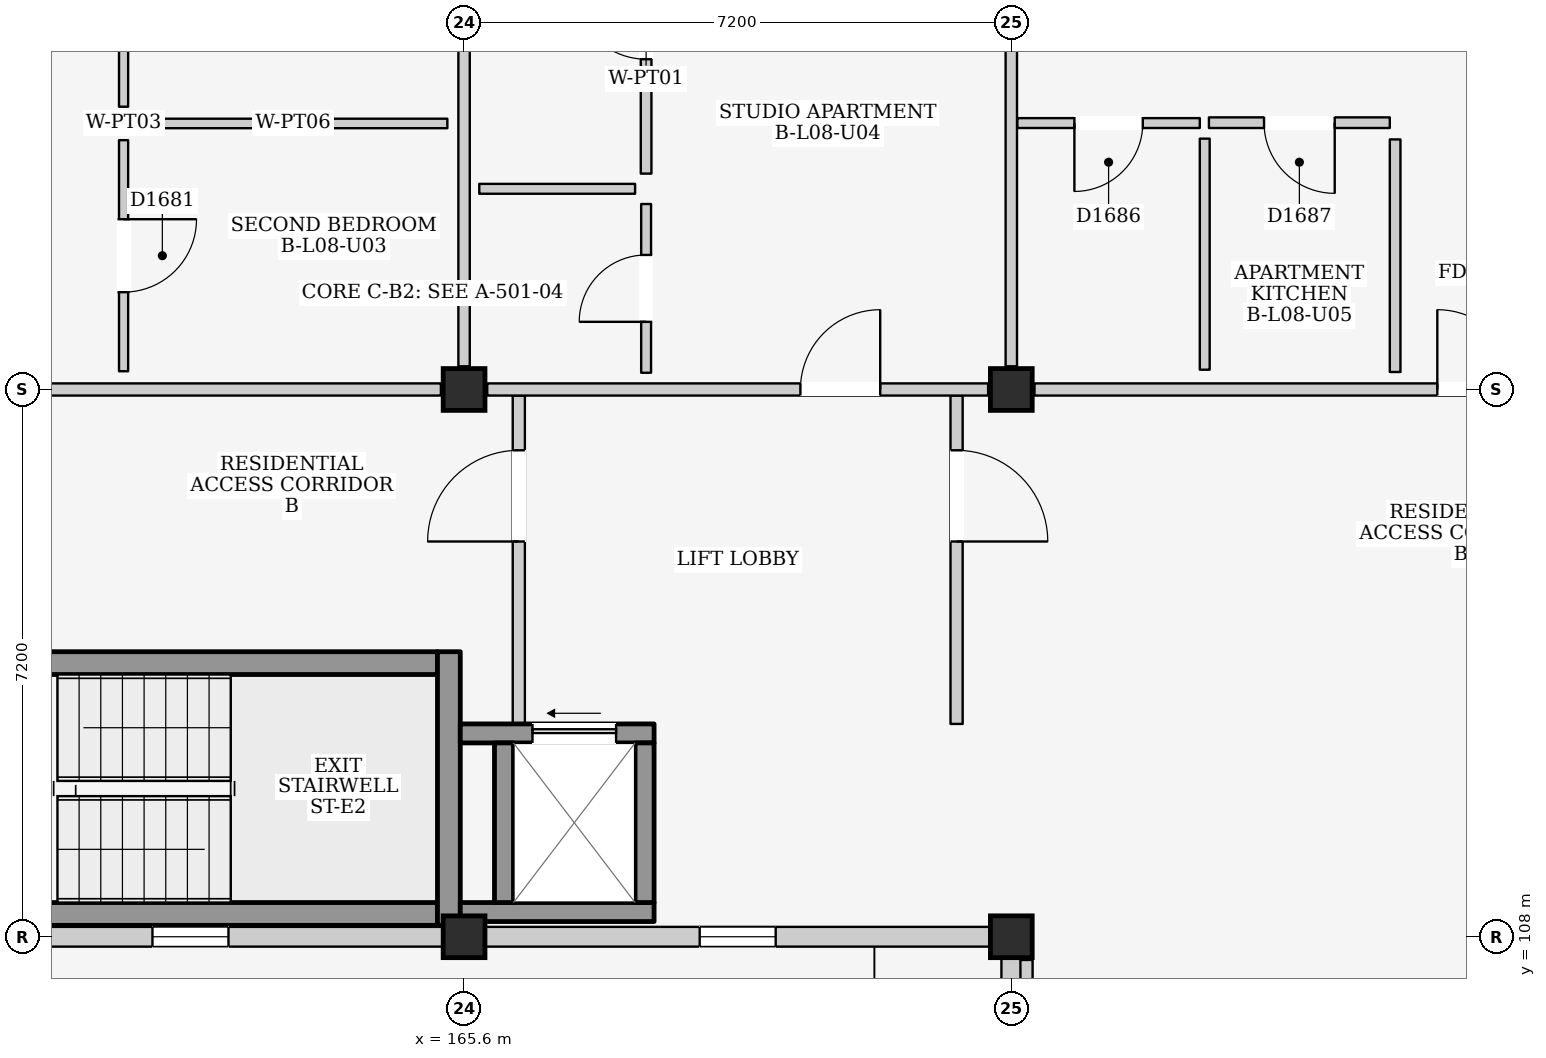
"""IFC4 building model, lengths in metres.
Left out: names, types, materials, properties, quantities, classifications, styles, units other than length and angle.
Written with IfcOpenShell. Run it as: python <this file> out.ifc"""

import sys

from ifc_helpers import new_model, si_unit, direction, frame, frame_2d, origin, origin_2d, place, context, subcontext, project, spatial, rectangle, extrude, element, fill, save


model = new_model("IFC4")
c1 = context("Model", 3, precision=1e-05, world=origin(), true_north=direction((0.0, 1.0)))
c2 = subcontext(c1, "Body", "Model", "MODEL_VIEW")
j1 = project(units=[si_unit("LENGTHUNIT", "METRE"), si_unit("PLANEANGLEUNIT", "RADIAN")], contexts=[c1])
p1 = place(None, origin())
s1 = spatial("IfcSite", under=j1, at=p1, CompositionType="ELEMENT")
p2 = place(p1, origin())
s2 = spatial("IfcBuilding", under=s1, at=p2, CompositionType="ELEMENT")
p3 = place(p2, frame((0.0, 0.0, 28.3)))
s3 = spatial("IfcBuildingStorey", under=s2, at=p3, CompositionType="ELEMENT", Elevation=28.3)
for number, where, z_axis, x_axis in (
    (1, (165.6, 108.0, 0.0), (0.0, 0.0, 1.0), (1.0, 0.0, 0.0)),
    (2, (165.6, 115.2, 0.0), (0.0, 0.0, 1.0), (1.0, 0.0, 0.0)),
    (3, (172.8, 108.0, 0.0), (0.0, 0.0, 1.0), (1.0, 0.0, 0.0)),
    (4, (172.8, 115.2, 0.0), (0.0, 0.0, 1.0), (1.0, 0.0, 0.0)),
):
    element("IfcColumn", number, at=place(p3, frame(where, z_axis=z_axis, x_axis=x_axis)), inside=s3, PredefinedType="COLUMN", context=c2, shape_type="SweptSolid", body=[
        extrude(rectangle(XDim=0.55, YDim=0.55, at=origin_2d()), origin(), (0.0, 0.0, 1.0), 3.2),
    ])
p4 = place(p3, frame((158.675, 108.0, 0.0), z_axis=(0.0, 0.0, 1.0), x_axis=(1.0, 0.0, 0.0)))
e5 = element("IfcWall", 5, at=p4, inside=s3, PredefinedType="ELEMENTEDWALL", context=c2, shape_type="SweptSolid", body=[
    extrude(rectangle(XDim=6.65, YDim=0.26, at=frame_2d((3.325, 0.0))), origin(), (0.0, 0.0, 1.0), 2.335),
])
p5 = place(p4, frame((2.825, 0.0, 1.2)))
e6 = element("IfcOpeningElement", 6, at=p5, cuts=e5, PredefinedType="OPENING", context=c2, shape_type="SweptSolid", body=[
    extrude(rectangle(XDim=1.0, YDim=0.9, at=frame_2d((0.5, 0.45))), frame((0.0, 0.145, 0.0), z_axis=(0.0, -1.0, 0.0), x_axis=(1.0, 0.0, 0.0)), (0.0, 0.0, 1.0), 0.29),
])
p6 = place(p3, frame((165.875, 108.0, 0.0), z_axis=(0.0, 0.0, 1.0), x_axis=(1.0, 0.0, 0.0)))
e7 = element("IfcWall", 7, at=p6, inside=s3, PredefinedType="ELEMENTEDWALL", context=c2, shape_type="SweptSolid", body=[
    extrude(rectangle(XDim=6.65, YDim=0.26, at=frame_2d((3.325, 0.0))), origin(), (0.0, 0.0, 1.0), 2.335),
])
p7 = place(p6, frame((2.825, 0.0, 1.2)))
e8 = element("IfcOpeningElement", 8, at=p7, cuts=e7, PredefinedType="OPENING", context=c2, shape_type="SweptSolid", body=[
    extrude(rectangle(XDim=1.0, YDim=0.9, at=frame_2d((0.5, 0.45))), frame((0.0, 0.145, 0.0), z_axis=(0.0, -1.0, 0.0), x_axis=(1.0, 0.0, 0.0)), (0.0, 0.0, 1.0), 0.29),
])
p8 = place(p3, frame((172.8, 101.075, 0.0), z_axis=(0.0, 0.0, 1.0), x_axis=(0.0, 1.0, 0.0)))
e9 = element("IfcWall", 9, at=p8, inside=s3, PredefinedType="ELEMENTEDWALL", context=c2, shape_type="SweptSolid", body=[
    extrude(rectangle(XDim=6.65, YDim=0.26, at=frame_2d((3.325, 0.0))), origin(), (0.0, 0.0, 1.0), 2.435),
])
p9 = place(p8, frame((2.5, 0.0, 0.0)))
e10 = element("IfcOpeningElement", 10, at=p9, cuts=e9, PredefinedType="OPENING", context=c2, shape_type="SweptSolid", body=[
    extrude(rectangle(XDim=1.4, YDim=2.1, at=frame_2d((0.7, 1.05))), frame((0.0, 0.145, 0.0), z_axis=(0.0, -1.0, 0.0), x_axis=(1.0, 0.0, 0.0)), (0.0, 0.0, 1.0), 0.29),
])
p10 = place(p3, frame((158.75, 108.3, 0.0), z_axis=(0.0, 0.0, 1.0), x_axis=(1.0, 0.0, 0.0)))
e11 = element("IfcWall", 11, at=p10, inside=s3, PredefinedType="SHEAR", context=c2, shape_type="SweptSolid", body=[
    extrude(rectangle(XDim=6.5, YDim=0.3, at=frame_2d((3.25, 0.0))), origin(), (0.0, 0.0, 1.0), 2.95),
])
p11 = place(p3, frame((158.75, 111.6, 0.0), z_axis=(0.0, 0.0, 1.0), x_axis=(1.0, 0.0, 0.0)))
e12 = element("IfcWall", 12, at=p11, inside=s3, PredefinedType="SHEAR", context=c2, shape_type="SweptSolid", body=[
    extrude(rectangle(XDim=6.5, YDim=0.3, at=frame_2d((3.25, 0.0))), origin(), (0.0, 0.0, 1.0), 2.95),
])
p12 = place(p11, frame((0.18, 0.0, 0.0)))
e13 = element("IfcOpeningElement", 13, at=p12, cuts=e12, PredefinedType="OPENING", context=c2, shape_type="SweptSolid", body=[
    extrude(rectangle(XDim=1.15, YDim=2.2, at=frame_2d((0.575, 1.1))), frame((0.0, 0.165, 0.0), z_axis=(0.0, -1.0, 0.0), x_axis=(1.0, 0.0, 0.0)), (0.0, 0.0, 1.0), 0.33),
])
p13 = place(p3, frame((165.4, 108.15, 0.0), z_axis=(0.0, 0.0, 1.0), x_axis=(0.0, 1.0, 0.0)))
e14 = element("IfcWall", 14, at=p13, inside=s3, PredefinedType="SHEAR", context=c2, shape_type="SweptSolid", body=[
    extrude(rectangle(XDim=3.6, YDim=0.3, at=frame_2d((1.8, 0.0))), origin(), (0.0, 0.0, 1.0), 2.95),
])
p14 = place(p3, frame((166.32, 110.8, 0.0), z_axis=(0.0, 0.0, 1.0), x_axis=(0.0, 1.0, 0.0)))
e15 = element("IfcWall", 15, at=p14, inside=s3, PredefinedType="PARTITIONING", context=c2, shape_type="SweptSolid", body=[
    extrude(rectangle(XDim=4.32, YDim=0.16, at=frame_2d((2.16, 0.0))), origin(), (0.0, 0.0, 1.0), 2.95),
])
p15 = place(p14, frame((2.4, 0.0, 0.0)))
e16 = element("IfcOpeningElement", 16, at=p15, cuts=e15, PredefinedType="OPENING", context=c2, shape_type="SweptSolid", body=[
    extrude(rectangle(XDim=1.2, YDim=2.2, at=frame_2d((0.6, 1.1))), frame((0.0, 0.095, 0.0), z_axis=(0.0, -1.0, 0.0), x_axis=(1.0, 0.0, 0.0)), (0.0, 0.0, 1.0), 0.19),
])
p16 = place(p3, frame((172.08, 110.8, 0.0), z_axis=(0.0, 0.0, 1.0), x_axis=(0.0, 1.0, 0.0)))
e17 = element("IfcWall", 17, at=p16, inside=s3, PredefinedType="PARTITIONING", context=c2, shape_type="SweptSolid", body=[
    extrude(rectangle(XDim=4.32, YDim=0.16, at=frame_2d((2.16, 0.0))), origin(), (0.0, 0.0, 1.0), 2.95),
])
p17 = place(p16, frame((2.4, 0.0, 0.0)))
e18 = element("IfcOpeningElement", 18, at=p17, cuts=e17, PredefinedType="OPENING", context=c2, shape_type="SweptSolid", body=[
    extrude(rectangle(XDim=1.2, YDim=2.2, at=frame_2d((0.6, 1.1))), frame((0.0, 0.095, 0.0), z_axis=(0.0, -1.0, 0.0), x_axis=(1.0, 0.0, 0.0)), (0.0, 0.0, 1.0), 0.19),
])
p18 = place(p3, frame((165.55, 108.325, 0.0), z_axis=(0.0, 0.0, 1.0), x_axis=(1.0, 0.0, 0.0)))
e19 = element("IfcWall", 19, at=p18, inside=s3, PredefinedType="SHEAR", context=c2, shape_type="SweptSolid", body=[
    extrude(rectangle(XDim=2.55, YDim=0.25, at=frame_2d((1.275, 0.0))), origin(), (0.0, 0.0, 1.0), 2.95),
])
p19 = place(p3, frame((165.55, 110.675, 0.0), z_axis=(0.0, 0.0, 1.0), x_axis=(1.0, 0.0, 0.0)))
e20 = element("IfcWall", 20, at=p19, inside=s3, PredefinedType="SHEAR", context=c2, shape_type="SweptSolid", body=[
    extrude(rectangle(XDim=2.55, YDim=0.25, at=frame_2d((1.275, 0.0))), origin(), (0.0, 0.0, 1.0), 2.95),
])
p20 = place(p19, frame((0.95, 0.0, 0.0)))
e21 = element("IfcOpeningElement", 21, at=p20, cuts=e20, PredefinedType="OPENING", context=c2, shape_type="SweptSolid", body=[
    extrude(rectangle(XDim=1.1, YDim=2.15, at=frame_2d((0.55, 1.075))), frame((0.0, 0.14, 0.0), z_axis=(0.0, -1.0, 0.0), x_axis=(1.0, 0.0, 0.0)), (0.0, 0.0, 1.0), 0.28),
])
for number, where, z_axis, x_axis in (
    (22, (166.125, 108.45, 0.0), (0.0, 0.0, 1.0), (0.0, 1.0, 0.0)),
    (23, (167.975, 108.45, 0.0), (0.0, 0.0, 1.0), (0.0, 1.0, 0.0)),
):
    element("IfcWall", number, at=place(p3, frame(where, z_axis=z_axis, x_axis=x_axis)), inside=s3, PredefinedType="SHEAR", context=c2, shape_type="SweptSolid", body=[
        extrude(rectangle(XDim=2.1, YDim=0.25, at=frame_2d((1.05, 0.0))), origin(), (0.0, 0.0, 1.0), 2.95),
    ])
p21 = place(p3, frame((158.705, 115.2, 0.0), z_axis=(0.0, 0.0, 1.0), x_axis=(1.0, 0.0, 0.0)))
e24 = element("IfcWall", 24, at=p21, inside=s3, PredefinedType="PARTITIONING", context=c2, shape_type="SweptSolid", body=[
    extrude(rectangle(XDim=6.59, YDim=0.16, at=frame_2d((3.295, 0.0))), origin(), (0.0, 0.0, 1.0), 2.335),
])
p22 = place(p3, frame((165.6, 115.505, 0.0), z_axis=(0.0, 0.0, 1.0), x_axis=(0.0, 1.0, 0.0)))
e25 = element("IfcWall", 25, at=p22, inside=s3, PredefinedType="PARTITIONING", context=c2, shape_type="SweptSolid", body=[
    extrude(rectangle(XDim=6.59, YDim=0.15, at=frame_2d((3.295, 0.0))), origin(), (0.0, 0.0, 1.0), 2.435),
])
p23 = place(p3, frame((161.12, 118.92, 0.0), z_axis=(0.0, 0.0, 1.0), x_axis=(0.0, 1.0, 0.0)))
e26 = element("IfcWall", 26, at=p23, inside=s3, PredefinedType="PARTITIONING", context=c2, shape_type="SweptSolid", body=[
    extrude(rectangle(XDim=3.04, YDim=0.12, at=frame_2d((1.52, 0.0))), origin(), (0.0, 0.0, 1.0), 2.95),
])
p24 = place(p23, frame((1.045, 0.0, 0.0)))
e27 = element("IfcOpeningElement", 27, at=p24, cuts=e26, PredefinedType="OPENING", context=c2, shape_type="SweptSolid", body=[
    extrude(rectangle(XDim=0.95, YDim=2.15, at=frame_2d((0.475, 1.075))), frame((0.0, 0.075, 0.0), z_axis=(0.0, -1.0, 0.0), x_axis=(1.0, 0.0, 0.0)), (0.0, 0.0, 1.0), 0.15),
])
p25 = place(p3, frame((161.32, 118.7, 0.0), z_axis=(0.0, 0.0, 1.0), x_axis=(1.0, 0.0, 0.0)))
e28 = element("IfcWall", 28, at=p25, inside=s3, PredefinedType="PARTITIONING", context=c2, shape_type="SweptSolid", body=[
    extrude(rectangle(XDim=4.06, YDim=0.125, at=frame_2d((2.03, 0.0))), origin(), (0.0, 0.0, 1.0), 2.95),
])
p26 = place(p3, frame((161.12, 115.44, 0.0), z_axis=(0.0, 0.0, 1.0), x_axis=(0.0, 1.0, 0.0)))
e29 = element("IfcWall", 29, at=p26, inside=s3, PredefinedType="PARTITIONING", context=c2, shape_type="SweptSolid", body=[
    extrude(rectangle(XDim=3.04, YDim=0.12, at=frame_2d((1.52, 0.0))), origin(), (0.0, 0.0, 1.0), 2.95),
])
p27 = place(p26, frame((1.04, 0.0, 0.0)))
e30 = element("IfcOpeningElement", 30, at=p27, cuts=e29, PredefinedType="OPENING", context=c2, shape_type="SweptSolid", body=[
    extrude(rectangle(XDim=0.96, YDim=2.15, at=frame_2d((0.48, 1.075))), frame((0.0, 0.075, 0.0), z_axis=(0.0, -1.0, 0.0), x_axis=(1.0, 0.0, 0.0)), (0.0, 0.0, 1.0), 0.15),
])
p28 = place(p3, frame((165.905, 115.2, 0.0), z_axis=(0.0, 0.0, 1.0), x_axis=(1.0, 0.0, 0.0)))
e31 = element("IfcWall", 31, at=p28, inside=s3, PredefinedType="PARTITIONING", context=c2, shape_type="SweptSolid", body=[
    extrude(rectangle(XDim=6.59, YDim=0.16, at=frame_2d((3.295, 0.0))), origin(), (0.0, 0.0, 1.0), 2.335),
])
p29 = place(p28, frame((4.12, 0.0, 0.0)))
e32 = element("IfcOpeningElement", 32, at=p29, cuts=e31, PredefinedType="OPENING", context=c2, shape_type="SweptSolid", body=[
    extrude(rectangle(XDim=1.05, YDim=2.15, at=frame_2d((0.525, 1.075))), frame((0.0, 0.095, 0.0), z_axis=(0.0, -1.0, 0.0), x_axis=(1.0, 0.0, 0.0)), (0.0, 0.0, 1.0), 0.19),
])
p30 = place(p3, frame((172.8, 115.505, 0.0), z_axis=(0.0, 0.0, 1.0), x_axis=(0.0, 1.0, 0.0)))
e33 = element("IfcWall", 33, at=p30, inside=s3, PredefinedType="PARTITIONING", context=c2, shape_type="SweptSolid", body=[
    extrude(rectangle(XDim=6.59, YDim=0.15, at=frame_2d((3.295, 0.0))), origin(), (0.0, 0.0, 1.0), 2.435),
])
p31 = place(p3, frame((165.8, 117.84, 0.0), z_axis=(0.0, 0.0, 1.0), x_axis=(1.0, 0.0, 0.0)))
e34 = element("IfcWall", 34, at=p31, inside=s3, PredefinedType="PARTITIONING", context=c2, shape_type="SweptSolid", body=[
    extrude(rectangle(XDim=2.05, YDim=0.13, at=frame_2d((1.025, 0.0))), origin(), (0.0, 0.0, 1.0), 2.95),
])
p32 = place(p3, frame((167.995, 115.42, 0.0), z_axis=(0.0, 0.0, 1.0), x_axis=(0.0, 1.0, 0.0)))
e35 = element("IfcWall", 35, at=p32, inside=s3, PredefinedType="PARTITIONING", context=c2, shape_type="SweptSolid", body=[
    extrude(rectangle(XDim=2.22, YDim=0.13, at=frame_2d((1.11, 0.0))), origin(), (0.0, 0.0, 1.0), 2.95),
])
p33 = place(p32, frame((0.67, 0.0, 0.0)))
e36 = element("IfcOpeningElement", 36, at=p33, cuts=e35, PredefinedType="OPENING", context=c2, shape_type="SweptSolid", body=[
    extrude(rectangle(XDim=0.88, YDim=2.1, at=frame_2d((0.44, 1.05))), frame((0.0, 0.08, 0.0), z_axis=(0.0, -1.0, 0.0), x_axis=(1.0, 0.0, 0.0)), (0.0, 0.0, 1.0), 0.16),
])
p34 = place(p3, frame((167.995, 118.04, 0.0), z_axis=(0.0, 0.0, 1.0), x_axis=(0.0, 1.0, 0.0)))
e37 = element("IfcWall", 37, at=p34, inside=s3, PredefinedType="PARTITIONING", context=c2, shape_type="SweptSolid", body=[
    extrude(rectangle(XDim=3.94, YDim=0.14, at=frame_2d((1.97, 0.0))), origin(), (0.0, 0.0, 1.0), 2.95),
])
p35 = place(p34, frame((1.505, 0.0, 0.0)))
e38 = element("IfcOpeningElement", 38, at=p35, cuts=e37, PredefinedType="OPENING", context=c2, shape_type="SweptSolid", body=[
    extrude(rectangle(XDim=0.93, YDim=2.14, at=frame_2d((0.465, 1.07))), frame((0.0, 0.085, 0.0), z_axis=(0.0, -1.0, 0.0), x_axis=(1.0, 0.0, 0.0)), (0.0, 0.0, 1.0), 0.17),
])
p36 = place(p3, frame((173.105, 115.2, 0.0), z_axis=(0.0, 0.0, 1.0), x_axis=(1.0, 0.0, 0.0)))
e39 = element("IfcWall", 39, at=p36, inside=s3, PredefinedType="PARTITIONING", context=c2, shape_type="SweptSolid", body=[
    extrude(rectangle(XDim=6.59, YDim=0.16, at=frame_2d((3.295, 0.0))), origin(), (0.0, 0.0, 1.0), 2.335),
])
p37 = place(p36, frame((5.3, 0.0, 0.0)))
e40 = element("IfcOpeningElement", 40, at=p37, cuts=e39, PredefinedType="OPENING", context=c2, shape_type="SweptSolid", body=[
    extrude(rectangle(XDim=1.05, YDim=2.15, at=frame_2d((0.525, 1.075))), frame((0.0, 0.095, 0.0), z_axis=(0.0, -1.0, 0.0), x_axis=(1.0, 0.0, 0.0)), (0.0, 0.0, 1.0), 0.19),
])
p38 = place(p3, frame((172.88, 118.705, 0.0), z_axis=(0.0, 0.0, 1.0), x_axis=(1.0, 0.0, 0.0)))
e41 = element("IfcWall", 41, at=p38, inside=s3, PredefinedType="PARTITIONING", context=c2, shape_type="SweptSolid", body=[
    extrude(rectangle(XDim=2.4, YDim=0.13, at=frame_2d((1.2, 0.0))), origin(), (0.0, 0.0, 1.0), 2.95),
])
p39 = place(p38, frame((0.75, 0.0, 0.0)))
e42 = element("IfcOpeningElement", 42, at=p39, cuts=e41, PredefinedType="OPENING", context=c2, shape_type="SweptSolid", body=[
    extrude(rectangle(XDim=0.9, YDim=2.1, at=frame_2d((0.45, 1.05))), frame((0.0, 0.08, 0.0), z_axis=(0.0, -1.0, 0.0), x_axis=(1.0, 0.0, 0.0)), (0.0, 0.0, 1.0), 0.16),
])
p40 = place(p3, frame((175.345, 115.46, 0.0), z_axis=(0.0, 0.0, 1.0), x_axis=(0.0, 1.0, 0.0)))
e43 = element("IfcWall", 43, at=p40, inside=s3, PredefinedType="PARTITIONING", context=c2, shape_type="SweptSolid", body=[
    extrude(rectangle(XDim=3.04, YDim=0.13, at=frame_2d((1.52, 0.0))), origin(), (0.0, 0.0, 1.0), 2.95),
])
p41 = place(p3, frame((175.4, 118.71, 0.0), z_axis=(0.0, 0.0, 1.0), x_axis=(1.0, 0.0, 0.0)))
e44 = element("IfcWall", 44, at=p41, inside=s3, PredefinedType="PARTITIONING", context=c2, shape_type="SweptSolid", body=[
    extrude(rectangle(XDim=2.38, YDim=0.14, at=frame_2d((1.19, 0.0))), origin(), (0.0, 0.0, 1.0), 2.95),
])
p42 = place(p41, frame((0.725, 0.0, 0.0)))
e45 = element("IfcOpeningElement", 45, at=p42, cuts=e44, PredefinedType="OPENING", context=c2, shape_type="SweptSolid", body=[
    extrude(rectangle(XDim=0.93, YDim=2.14, at=frame_2d((0.465, 1.07))), frame((0.0, 0.085, 0.0), z_axis=(0.0, -1.0, 0.0), x_axis=(1.0, 0.0, 0.0)), (0.0, 0.0, 1.0), 0.17),
])
p43 = place(p3, frame((177.85, 115.43, 0.0), z_axis=(0.0, 0.0, 1.0), x_axis=(0.0, 1.0, 0.0)))
e46 = element("IfcWall", 46, at=p43, inside=s3, PredefinedType="PARTITIONING", context=c2, shape_type="SweptSolid", body=[
    extrude(rectangle(XDim=3.06, YDim=0.14, at=frame_2d((1.53, 0.0))), origin(), (0.0, 0.0, 1.0), 2.95),
])
p44 = place(p3, frame((173.0, 101.105, 0.0), z_axis=(0.0, 0.0, 1.0), x_axis=(0.0, 1.0, 0.0)))
e47 = element("IfcWall", 47, at=p44, inside=s3, PredefinedType="PARTITIONING", context=c2, shape_type="SweptSolid", body=[
    extrude(rectangle(XDim=6.59, YDim=0.16, at=frame_2d((3.295, 0.0))), origin(), (0.0, 0.0, 1.0), 2.95),
])
p45 = place(p44, frame((2.785, 0.0, 0.0)))
e48 = element("IfcOpeningElement", 48, at=p45, cuts=e47, PredefinedType="OPENING", context=c2, shape_type="SweptSolid", body=[
    extrude(rectangle(XDim=1.02, YDim=2.18, at=frame_2d((0.51, 1.09))), frame((0.0, 0.095, 0.0), z_axis=(0.0, -1.0, 0.0), x_axis=(1.0, 0.0, 0.0)), (0.0, 0.0, 1.0), 0.19),
])
p46 = place(p5, origin())
e49 = element("IfcWindow", 49, at=p46, inside=s3, PartitioningType="SINGLE_PANEL", PredefinedType="WINDOW", context=c2, shape_type="SweptSolid", body=[
    extrude(rectangle(XDim=1.0, YDim=0.9, at=frame_2d((0.5, 0.45))), frame((0.0, 0.03, 0.0), z_axis=(0.0, -1.0, 0.0), x_axis=(1.0, 0.0, 0.0)), (0.0, 0.0, 1.0), 0.06),
])
fill(e6, e49)
p47 = place(p7, origin())
e50 = element("IfcWindow", 50, at=p47, inside=s3, PartitioningType="SINGLE_PANEL", PredefinedType="WINDOW", context=c2, shape_type="SweptSolid", body=[
    extrude(rectangle(XDim=1.0, YDim=0.9, at=frame_2d((0.5, 0.45))), frame((0.0, 0.03, 0.0), z_axis=(0.0, -1.0, 0.0), x_axis=(1.0, 0.0, 0.0)), (0.0, 0.0, 1.0), 0.06),
])
fill(e8, e50)
p48 = place(p15, origin())
e51 = element("IfcDoor", 51, at=p48, inside=s3, OperationType="SINGLE_SWING_LEFT", PredefinedType="DOOR", context=c2, shape_type="SweptSolid", body=[
    extrude(rectangle(XDim=1.2, YDim=2.2, at=frame_2d((0.6, 1.1))), frame((0.0, 0.025, 0.0), z_axis=(0.0, -1.0, 0.0), x_axis=(1.0, 0.0, 0.0)), (0.0, 0.0, 1.0), 0.05),
])
fill(e16, e51)
p49 = place(p17, frame((1.2, 0.0, 0.0), z_axis=(0.0, 0.0, 1.0), x_axis=(-1.0, 0.0, 0.0)))
e52 = element("IfcDoor", 52, at=p49, inside=s3, OperationType="SINGLE_SWING_RIGHT", PredefinedType="DOOR", context=c2, shape_type="SweptSolid", body=[
    extrude(rectangle(XDim=1.2, YDim=2.2, at=frame_2d((0.6, 1.1))), frame((0.0, 0.025, 0.0), z_axis=(0.0, -1.0, 0.0), x_axis=(1.0, 0.0, 0.0)), (0.0, 0.0, 1.0), 0.05),
])
fill(e18, e52)
p50 = place(p20, origin())
e53 = element("IfcDoor", 53, at=p50, inside=s3, OperationType="SLIDING_TO_LEFT", PredefinedType="DOOR", context=c2, shape_type="SweptSolid", body=[
    extrude(rectangle(XDim=1.1, YDim=2.15, at=frame_2d((0.55, 1.075))), frame((0.0, 0.025, 0.0), z_axis=(0.0, -1.0, 0.0), x_axis=(1.0, 0.0, 0.0)), (0.0, 0.0, 1.0), 0.05),
])
fill(e21, e53)
p51 = place(p27, frame((0.96, 0.0, 0.0), z_axis=(0.0, 0.0, 1.0), x_axis=(-1.0, 0.0, 0.0)))
e54 = element("IfcDoor", 54, at=p51, inside=s3, OperationType="SINGLE_SWING_LEFT", PredefinedType="DOOR", context=c2, shape_type="SweptSolid", body=[
    extrude(rectangle(XDim=0.96, YDim=2.15, at=frame_2d((0.48, 1.075))), frame((0.0, 0.025, 0.0), z_axis=(0.0, -1.0, 0.0), x_axis=(1.0, 0.0, 0.0)), (0.0, 0.0, 1.0), 0.05),
])
fill(e30, e54)
p52 = place(p29, origin())
e55 = element("IfcDoor", 55, at=p52, inside=s3, OperationType="SINGLE_SWING_RIGHT", PredefinedType="DOOR", context=c2, shape_type="SweptSolid", body=[
    extrude(rectangle(XDim=1.05, YDim=2.15, at=frame_2d((0.525, 1.075))), frame((0.0, 0.025, 0.0), z_axis=(0.0, -1.0, 0.0), x_axis=(1.0, 0.0, 0.0)), (0.0, 0.0, 1.0), 0.05),
])
fill(e32, e55)
p53 = place(p33, origin())
e56 = element("IfcDoor", 56, at=p53, inside=s3, OperationType="SINGLE_SWING_LEFT", PredefinedType="DOOR", context=c2, shape_type="SweptSolid", body=[
    extrude(rectangle(XDim=0.88, YDim=2.1, at=frame_2d((0.44, 1.05))), frame((0.0, 0.025, 0.0), z_axis=(0.0, -1.0, 0.0), x_axis=(1.0, 0.0, 0.0)), (0.0, 0.0, 1.0), 0.05),
])
fill(e36, e56)
p54 = place(p35, origin())
e57 = element("IfcDoor", 57, at=p54, inside=s3, OperationType="SINGLE_SWING_RIGHT", PredefinedType="DOOR", context=c2, shape_type="SweptSolid", body=[
    extrude(rectangle(XDim=0.93, YDim=2.14, at=frame_2d((0.465, 1.07))), frame((0.0, 0.025, 0.0), z_axis=(0.0, -1.0, 0.0), x_axis=(1.0, 0.0, 0.0)), (0.0, 0.0, 1.0), 0.05),
])
fill(e38, e57)
p55 = place(p37, origin())
e58 = element("IfcDoor", 58, at=p55, inside=s3, OperationType="SINGLE_SWING_LEFT", PredefinedType="DOOR", context=c2, shape_type="SweptSolid", body=[
    extrude(rectangle(XDim=1.05, YDim=2.15, at=frame_2d((0.525, 1.075))), frame((0.0, 0.025, 0.0), z_axis=(0.0, -1.0, 0.0), x_axis=(1.0, 0.0, 0.0)), (0.0, 0.0, 1.0), 0.05),
])
fill(e40, e58)
p56 = place(p39, frame((0.9, 0.0, 0.0), z_axis=(0.0, 0.0, 1.0), x_axis=(-1.0, 0.0, 0.0)))
e59 = element("IfcDoor", 59, at=p56, inside=s3, OperationType="SINGLE_SWING_RIGHT", PredefinedType="DOOR", context=c2, shape_type="SweptSolid", body=[
    extrude(rectangle(XDim=0.9, YDim=2.1, at=frame_2d((0.45, 1.05))), frame((0.0, 0.025, 0.0), z_axis=(0.0, -1.0, 0.0), x_axis=(1.0, 0.0, 0.0)), (0.0, 0.0, 1.0), 0.05),
])
fill(e42, e59)
p57 = place(p42, frame((0.93, 0.0, 0.0), z_axis=(0.0, 0.0, 1.0), x_axis=(-1.0, 0.0, 0.0)))
e60 = element("IfcDoor", 60, at=p57, inside=s3, OperationType="SINGLE_SWING_LEFT", PredefinedType="DOOR", context=c2, shape_type="SweptSolid", body=[
    extrude(rectangle(XDim=0.93, YDim=2.14, at=frame_2d((0.465, 1.07))), frame((0.0, 0.025, 0.0), z_axis=(0.0, -1.0, 0.0), x_axis=(1.0, 0.0, 0.0)), (0.0, 0.0, 1.0), 0.05),
])
fill(e45, e60)
save(model, sys.argv[1])
